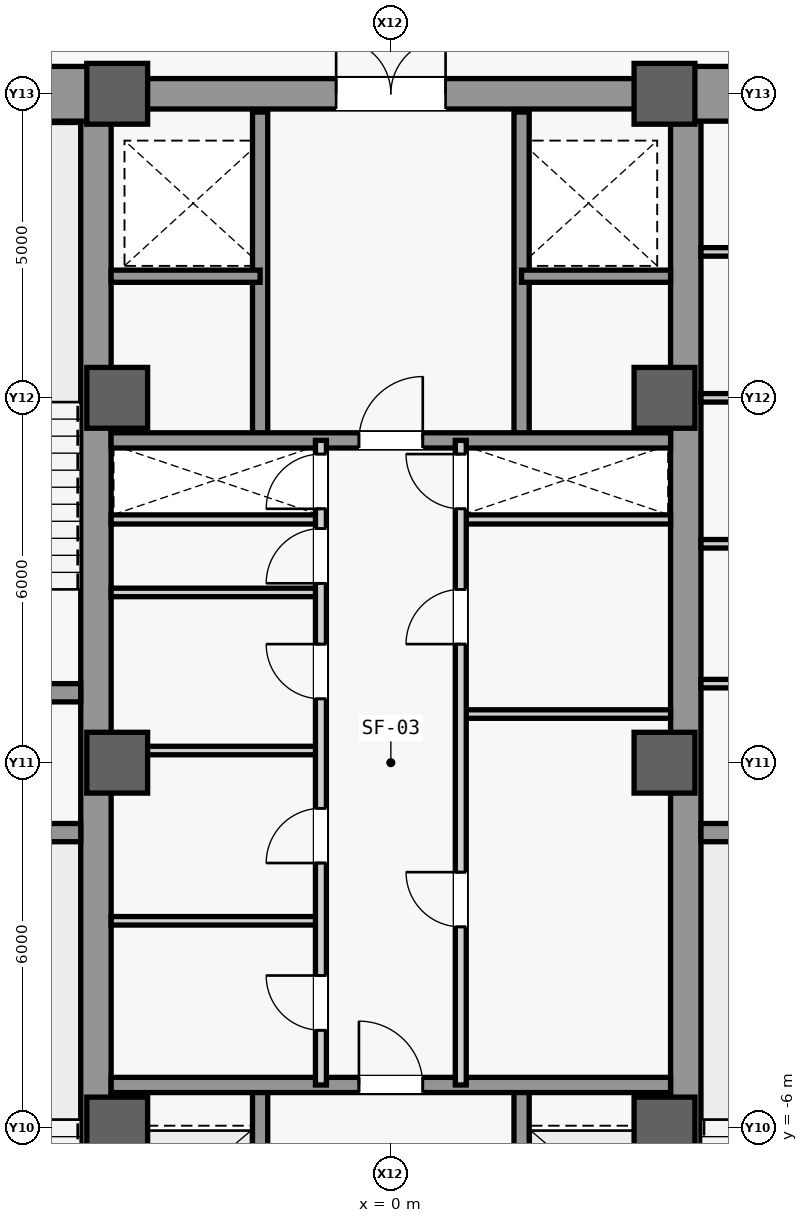
"""IFC4 building model, lengths in metres.
Left out: names, types, materials, properties, quantities, classifications, styles, units other than length and angle.
Written with IfcOpenShell. Run it as: python <this file> out.ifc"""

import sys

from ifc_helpers import new_model, si_unit, direction, frame, frame_2d, origin, origin_2d, place, context, subcontext, project, spatial, rectangle, extrude, source, transform, mapped, element, fill, save


model = new_model("IFC4")
c1 = context("Model", 3, precision=1e-05, world=origin(), true_north=direction((0.0, 1.0)))
c2 = subcontext(c1, "Body", "Model", "MODEL_VIEW")
j1 = project(units=[si_unit("LENGTHUNIT", "METRE"), si_unit("PLANEANGLEUNIT", "RADIAN")], contexts=[c1])
p1 = place(None, origin())
s1 = spatial("IfcSite", under=j1, at=p1, CompositionType="ELEMENT")
p2 = place(p1, origin())
s2 = spatial("IfcBuilding", under=s1, at=p2, CompositionType="ELEMENT")
p3 = place(p2, frame((0.0, 0.0, 57.8)))
s3 = spatial("IfcBuildingStorey", under=s2, at=p3, CompositionType="ELEMENT", Elevation=57.8)
m1 = source(origin(), c2, "Body", "SweptSolid", [
    extrude(rectangle(XDim=21.4, YDim=0.5, at=frame_2d((10.7, 0.0))), origin(), (0.0, 0.0, 1.0), 3.94),
])
for number, where, z_axis, x_axis in (
    (1, (-4.85, -10.7, 0.0), (0.0, 0.0, 1.0), (0.0, 1.0, 0.0)),
    (2, (4.85, -10.7, 0.0), (0.0, 0.0, 1.0), (0.0, 1.0, 0.0)),
):
    element("IfcWall", number, at=place(p3, frame(where, z_axis=z_axis, x_axis=x_axis)), inside=s3, PredefinedType="SHEAR", context=c2, shape_type="MappedRepresentation", body=[
        mapped(m1, transform((0.0, 0.0, 0.0), scale=1.0)),
    ])
m2 = source(origin(), c2, "Body", "SweptSolid", [
    extrude(rectangle(XDim=5.85, YDim=0.9, at=frame_2d((2.925, 0.0))), origin(), (0.0, 0.0, 1.0), 3.94),
])
p4 = place(p3, frame((-10.7, 11.0, 0.0), z_axis=(0.0, 0.0, 1.0), x_axis=(1.0, 0.0, 0.0)))
e3 = element("IfcWall", 3, at=p4, inside=s3, PredefinedType="SHEAR", context=c2, shape_type="MappedRepresentation", body=[
    mapped(m2, transform((0.0, 0.0, 0.0), scale=1.0)),
])
p5 = place(p3, frame((4.85, 11.0, 0.0), z_axis=(0.0, 0.0, 1.0), x_axis=(1.0, 0.0, 0.0)))
e4 = element("IfcWall", 4, at=p5, inside=s3, PredefinedType="SHEAR", context=c2, shape_type="MappedRepresentation", body=[
    mapped(m2, transform((0.0, 0.0, 0.0), scale=1.0)),
])
m3 = source(origin(), c2, "Body", "SweptSolid", [
    extrude(rectangle(XDim=1.05, YDim=2.2, at=frame_2d((0.525, 1.1))), frame((0.0, 0.46, 0.0), z_axis=(0.0, -1.0, 0.0), x_axis=(1.0, 0.0, 0.0)), (0.0, 0.0, 1.0), 0.92),
])
p6 = place(p5, frame((1.375, 0.0, 0.0)))
e5 = element("IfcOpeningElement", 5, at=p6, cuts=e4, PredefinedType="OPENING", context=c2, shape_type="MappedRepresentation", body=[
    mapped(m3, transform((0.0, 0.0, 0.0), scale=1.0)),
])
m4 = source(origin(), c2, "Body", "SweptSolid", [
    extrude(rectangle(XDim=5.6, YDim=0.3, at=frame_2d((2.8, 0.0))), origin(), (0.0, 0.0, 1.0), 3.94),
])
for number, where, z_axis, x_axis in (
    (6, (-10.7, -1.15, 0.0), (0.0, 0.0, 1.0), (1.0, 0.0, 0.0)),
    (7, (-10.7, 1.15, 0.0), (0.0, 0.0, 1.0), (1.0, 0.0, 0.0)),
    (8, (5.1, -1.15, 0.0), (0.0, 0.0, 1.0), (1.0, 0.0, 0.0)),
):
    element("IfcWall", number, at=place(p3, frame(where, z_axis=z_axis, x_axis=x_axis)), inside=s3, PredefinedType="SHEAR", context=c2, shape_type="MappedRepresentation", body=[
        mapped(m4, transform((0.0, 0.0, 0.0), scale=1.0)),
    ])
m5 = source(origin(), c2, "Body", "SweptSolid", [
    extrude(rectangle(XDim=9.2, YDim=0.5, at=frame_2d((4.6, 0.0))), origin(), (0.0, 0.0, 1.0), 3.94),
])
p7 = place(p3, frame((-4.6, 11.0, 0.0), z_axis=(0.0, 0.0, 1.0), x_axis=(1.0, 0.0, 0.0)))
e9 = element("IfcWall", 9, at=p7, inside=s3, PredefinedType="SHEAR", context=c2, shape_type="MappedRepresentation", body=[
    mapped(m5, transform((0.0, 0.0, 0.0), scale=1.0)),
])
m6 = source(origin(), c2, "Body", "SweptSolid", [
    extrude(rectangle(XDim=1.8, YDim=2.25, at=frame_2d((0.9, 1.125))), frame((0.0, 0.26, 0.0), z_axis=(0.0, -1.0, 0.0), x_axis=(1.0, 0.0, 0.0)), (0.0, 0.0, 1.0), 0.52),
])
p8 = place(p7, frame((3.7, 0.0, 0.0)))
e10 = element("IfcOpeningElement", 10, at=p8, cuts=e9, PredefinedType="OPENING", context=c2, shape_type="MappedRepresentation", body=[
    mapped(m6, transform((0.0, 0.0, 0.0), scale=1.0)),
])
m7 = source(origin(), c2, "Body", "SweptSolid", [
    extrude(rectangle(XDim=1.0, YDim=1.0, at=origin_2d()), origin(), (0.0, 0.0, 1.0), 4.2),
])
for number, where, z_axis, x_axis in (
    (11, (-4.5, -6.0, 0.0), (0.0, 0.0, 1.0), (1.0, 0.0, 0.0)),
    (12, (-4.5, 0.0, 0.0), (0.0, 0.0, 1.0), (1.0, 0.0, 0.0)),
    (13, (-4.5, 6.0, 0.0), (0.0, 0.0, 1.0), (1.0, 0.0, 0.0)),
    (14, (-4.5, 11.0, 0.0), (0.0, 0.0, 1.0), (1.0, 0.0, 0.0)),
    (15, (4.5, -6.0, 0.0), (0.0, 0.0, 1.0), (1.0, 0.0, 0.0)),
    (16, (4.5, 0.0, 0.0), (0.0, 0.0, 1.0), (1.0, 0.0, 0.0)),
    (17, (4.5, 6.0, 0.0), (0.0, 0.0, 1.0), (1.0, 0.0, 0.0)),
    (18, (4.5, 11.0, 0.0), (0.0, 0.0, 1.0), (1.0, 0.0, 0.0)),
):
    element("IfcColumn", number, at=place(p3, frame(where, z_axis=z_axis, x_axis=x_axis)), inside=s3, PredefinedType="COLUMN", context=c2, shape_type="MappedRepresentation", body=[
        mapped(m7, transform((0.0, 0.0, 0.0), scale=1.0)),
    ])
m8 = source(origin(), c2, "Body", "SweptSolid", [
    extrude(rectangle(XDim=3.15, YDim=0.14, at=frame_2d((1.575, 0.0))), origin(), (0.0, 0.0, 1.0), 3.94),
])
p9 = place(p3, frame((5.1, 1.3, 0.0), z_axis=(0.0, 0.0, 1.0), x_axis=(1.0, 0.0, 0.0)))
e19 = element("IfcWall", 19, at=p9, inside=s3, PredefinedType="PARTITIONING", context=c2, shape_type="MappedRepresentation", body=[
    mapped(m8, transform((0.0, 0.0, 0.0), scale=1.0)),
])
p10 = place(p3, frame((5.1, 8.4, 0.0), z_axis=(0.0, 0.0, 1.0), x_axis=(1.0, 0.0, 0.0)))
e20 = element("IfcWall", 20, at=p10, inside=s3, PredefinedType="PARTITIONING", context=c2, shape_type="MappedRepresentation", body=[
    mapped(m8, transform((0.0, 0.0, 0.0), scale=1.0)),
])
m9 = source(origin(), c2, "Body", "SweptSolid", [
    extrude(rectangle(XDim=0.9, YDim=2.15, at=frame_2d((0.45, 1.075))), frame((0.0, 0.08, 0.0), z_axis=(0.0, -1.0, 0.0), x_axis=(1.0, 0.0, 0.0)), (0.0, 0.0, 1.0), 0.16),
])
p11 = place(p10, frame((1.13, 0.0, 0.0)))
e21 = element("IfcOpeningElement", 21, at=p11, cuts=e20, PredefinedType="OPENING", context=c2, shape_type="MappedRepresentation", body=[
    mapped(m9, transform((0.0, 0.0, 0.0), scale=1.0)),
])
p12 = place(p3, frame((5.1, 6.0, 0.0), z_axis=(0.0, 0.0, 1.0), x_axis=(1.0, 0.0, 0.0)))
e22 = element("IfcWall", 22, at=p12, inside=s3, PredefinedType="PARTITIONING", context=c2, shape_type="MappedRepresentation", body=[
    mapped(m8, transform((0.0, 0.0, 0.0), scale=1.0)),
])
p13 = place(p12, frame((1.13, 0.0, 0.0)))
e23 = element("IfcOpeningElement", 23, at=p13, cuts=e22, PredefinedType="OPENING", context=c2, shape_type="MappedRepresentation", body=[
    mapped(m9, transform((0.0, 0.0, 0.0), scale=1.0)),
])
p14 = place(p3, frame((5.1, 3.6, 0.0), z_axis=(0.0, 0.0, 1.0), x_axis=(1.0, 0.0, 0.0)))
e24 = element("IfcWall", 24, at=p14, inside=s3, PredefinedType="PARTITIONING", context=c2, shape_type="MappedRepresentation", body=[
    mapped(m8, transform((0.0, 0.0, 0.0), scale=1.0)),
])
p15 = place(p14, frame((1.13, 0.0, 0.0)))
e25 = element("IfcOpeningElement", 25, at=p15, cuts=e24, PredefinedType="OPENING", context=c2, shape_type="MappedRepresentation", body=[
    mapped(m9, transform((0.0, 0.0, 0.0), scale=1.0)),
])
m10 = source(origin(), c2, "Body", "SweptSolid", [
    extrude(rectangle(XDim=3.45, YDim=0.15, at=frame_2d((1.725, 0.0))), origin(), (0.0, 0.0, 1.0), 3.94),
])
for number, where, z_axis, x_axis in (
    (26, (-4.6, 4.0, 0.0), (0.0, 0.0, 1.0), (1.0, 0.0, 0.0)),
    (27, (1.15, 4.0, 0.0), (0.0, 0.0, 1.0), (1.0, 0.0, 0.0)),
):
    element("IfcWall", number, at=place(p3, frame(where, z_axis=z_axis, x_axis=x_axis)), inside=s3, PredefinedType="PARTITIONING", context=c2, shape_type="MappedRepresentation", body=[
        mapped(m10, transform((0.0, 0.0, 0.0), scale=1.0)),
    ])
m11 = source(origin(), c2, "Body", "SweptSolid", [
    extrude(rectangle(XDim=5.4, YDim=0.25, at=frame_2d((2.7, 0.0))), origin(), (0.0, 0.0, 1.0), 3.94),
])
p16 = place(p3, frame((-2.15, -10.7, 0.0), z_axis=(0.0, 0.0, 1.0), x_axis=(0.0, 1.0, 0.0)))
e28 = element("IfcWall", 28, at=p16, inside=s3, PredefinedType="SHEAR", context=c2, shape_type="MappedRepresentation", body=[
    mapped(m11, transform((0.0, 0.0, 0.0), scale=1.0)),
])
m12 = source(origin(), c2, "Body", "SweptSolid", [
    extrude(rectangle(XDim=1.2, YDim=2.3, at=frame_2d((0.6, 1.15))), frame((0.0, 0.135, 0.0), z_axis=(0.0, -1.0, 0.0), x_axis=(1.0, 0.0, 0.0)), (0.0, 0.0, 1.0), 0.27),
])
p17 = place(p16, frame((0.9, 0.0, 0.0)))
e29 = element("IfcOpeningElement", 29, at=p17, cuts=e28, PredefinedType="OPENING", context=c2, shape_type="MappedRepresentation", body=[
    mapped(m12, transform((0.0, 0.0, 0.0), scale=1.0)),
])
p18 = place(p16, frame((3.2, 0.0, 0.0)))
e30 = element("IfcOpeningElement", 30, at=p18, cuts=e28, PredefinedType="OPENING", context=c2, shape_type="MappedRepresentation", body=[
    mapped(m12, transform((0.0, 0.0, 0.0), scale=1.0)),
])
p19 = place(p3, frame((2.15, -10.7, 0.0), z_axis=(0.0, 0.0, 1.0), x_axis=(0.0, 1.0, 0.0)))
e31 = element("IfcWall", 31, at=p19, inside=s3, PredefinedType="SHEAR", context=c2, shape_type="MappedRepresentation", body=[
    mapped(m11, transform((0.0, 0.0, 0.0), scale=1.0)),
])
p20 = place(p19, frame((0.9, 0.0, 0.0)))
e32 = element("IfcOpeningElement", 32, at=p20, cuts=e31, PredefinedType="OPENING", context=c2, shape_type="MappedRepresentation", body=[
    mapped(m12, transform((0.0, 0.0, 0.0), scale=1.0)),
])
p21 = place(p19, frame((3.2, 0.0, 0.0)))
e33 = element("IfcOpeningElement", 33, at=p21, cuts=e31, PredefinedType="OPENING", context=c2, shape_type="MappedRepresentation", body=[
    mapped(m12, transform((0.0, 0.0, 0.0), scale=1.0)),
])
m13 = source(origin(), c2, "Body", "SweptSolid", [
    extrude(rectangle(XDim=9.2, YDim=0.25, at=frame_2d((4.6, 0.0))), origin(), (0.0, 0.0, 1.0), 3.94),
])
p22 = place(p3, frame((-4.6, -5.3, 0.0), z_axis=(0.0, 0.0, 1.0), x_axis=(1.0, 0.0, 0.0)))
e34 = element("IfcWall", 34, at=p22, inside=s3, PredefinedType="SHEAR", context=c2, shape_type="MappedRepresentation", body=[
    mapped(m13, transform((0.0, 0.0, 0.0), scale=1.0)),
])
m14 = source(origin(), c2, "Body", "SweptSolid", [
    extrude(rectangle(XDim=1.05, YDim=2.2, at=frame_2d((0.525, 1.1))), frame((0.0, 0.135, 0.0), z_axis=(0.0, -1.0, 0.0), x_axis=(1.0, 0.0, 0.0)), (0.0, 0.0, 1.0), 0.27),
])
p23 = place(p22, frame((4.075, 0.0, 0.0)))
e35 = element("IfcOpeningElement", 35, at=p23, cuts=e34, PredefinedType="OPENING", context=c2, shape_type="MappedRepresentation", body=[
    mapped(m14, transform((0.0, 0.0, 0.0), scale=1.0)),
])
for number, where, z_axis, x_axis in (
    (36, (-2.15, 5.3, 0.0), (0.0, 0.0, 1.0), (0.0, 1.0, 0.0)),
    (37, (2.15, 5.3, 0.0), (0.0, 0.0, 1.0), (0.0, 1.0, 0.0)),
):
    element("IfcWall", number, at=place(p3, frame(where, z_axis=z_axis, x_axis=x_axis)), inside=s3, PredefinedType="SHEAR", context=c2, shape_type="MappedRepresentation", body=[
        mapped(m11, transform((0.0, 0.0, 0.0), scale=1.0)),
    ])
m15 = source(origin(), c2, "Body", "SweptSolid", [
    extrude(rectangle(XDim=2.45, YDim=0.2, at=frame_2d((1.225, 0.0))), origin(), (0.0, 0.0, 1.0), 3.94),
])
for number, where, z_axis, x_axis in (
    (38, (-4.6, 8.0, 0.0), (0.0, 0.0, 1.0), (1.0, 0.0, 0.0)),
    (39, (2.15, 8.0, 0.0), (0.0, 0.0, 1.0), (1.0, 0.0, 0.0)),
):
    element("IfcWall", number, at=place(p3, frame(where, z_axis=z_axis, x_axis=x_axis)), inside=s3, PredefinedType="SHEAR", context=c2, shape_type="MappedRepresentation", body=[
        mapped(m15, transform((0.0, 0.0, 0.0), scale=1.0)),
    ])
p24 = place(p3, frame((-4.6, 5.3, 0.0), z_axis=(0.0, 0.0, 1.0), x_axis=(1.0, 0.0, 0.0)))
e40 = element("IfcWall", 40, at=p24, inside=s3, PredefinedType="SHEAR", context=c2, shape_type="MappedRepresentation", body=[
    mapped(m13, transform((0.0, 0.0, 0.0), scale=1.0)),
])
p25 = place(p24, frame((4.075, 0.0, 0.0)))
e41 = element("IfcOpeningElement", 41, at=p25, cuts=e40, PredefinedType="OPENING", context=c2, shape_type="MappedRepresentation", body=[
    mapped(m14, transform((0.0, 0.0, 0.0), scale=1.0)),
])
m16 = source(origin(), c2, "Body", "SweptSolid", [
    extrude(rectangle(XDim=3.45, YDim=0.14, at=frame_2d((1.725, 0.0))), origin(), (0.0, 0.0, 1.0), 3.94),
])
p26 = place(p3, frame((-4.6, -2.6, 0.0), z_axis=(0.0, 0.0, 1.0), x_axis=(1.0, 0.0, 0.0)))
e42 = element("IfcWall", 42, at=p26, inside=s3, PredefinedType="PARTITIONING", context=c2, shape_type="MappedRepresentation", body=[
    mapped(m16, transform((0.0, 0.0, 0.0), scale=1.0)),
])
m17 = source(origin(), c2, "Body", "SweptSolid", [
    extrude(rectangle(XDim=3.45, YDim=0.14, at=frame_2d((1.725, 0.0))), origin(), (0.0, 0.0, 1.0), 3.245),
])
p27 = place(p3, frame((-4.6, 0.2, 0.0), z_axis=(0.0, 0.0, 1.0), x_axis=(1.0, 0.0, 0.0)))
e43 = element("IfcWall", 43, at=p27, inside=s3, PredefinedType="PARTITIONING", context=c2, shape_type="MappedRepresentation", body=[
    mapped(m17, transform((0.0, 0.0, 0.0), scale=1.0)),
])
p28 = place(p3, frame((-4.6, 2.8, 0.0), z_axis=(0.0, 0.0, 1.0), x_axis=(1.0, 0.0, 0.0)))
e44 = element("IfcWall", 44, at=p28, inside=s3, PredefinedType="PARTITIONING", context=c2, shape_type="MappedRepresentation", body=[
    mapped(m16, transform((0.0, 0.0, 0.0), scale=1.0)),
])
m18 = source(origin(), c2, "Body", "SweptSolid", [
    extrude(rectangle(XDim=10.6, YDim=0.18, at=frame_2d((5.3, 0.0))), origin(), (0.0, 0.0, 1.0), 3.94),
])
p29 = place(p3, frame((-1.15, -5.3, 0.0), z_axis=(0.0, 0.0, 1.0), x_axis=(0.0, 1.0, 0.0)))
e45 = element("IfcWall", 45, at=p29, inside=s3, PredefinedType="PARTITIONING", context=c2, shape_type="MappedRepresentation", body=[
    mapped(m18, transform((0.0, 0.0, 0.0), scale=1.0)),
])
m19 = source(origin(), c2, "Body", "SweptSolid", [
    extrude(rectangle(XDim=0.9, YDim=2.15, at=frame_2d((0.45, 1.075))), frame((0.0, 0.1, 0.0), z_axis=(0.0, -1.0, 0.0), x_axis=(1.0, 0.0, 0.0)), (0.0, 0.0, 1.0), 0.2),
])
p30 = place(p29, frame((0.9, 0.0, 0.0)))
e46 = element("IfcOpeningElement", 46, at=p30, cuts=e45, PredefinedType="OPENING", context=c2, shape_type="MappedRepresentation", body=[
    mapped(m19, transform((0.0, 0.0, 0.0), scale=1.0)),
])
p31 = place(p29, frame((3.65, 0.0, 0.0)))
e47 = element("IfcOpeningElement", 47, at=p31, cuts=e45, PredefinedType="OPENING", context=c2, shape_type="MappedRepresentation", body=[
    mapped(m19, transform((0.0, 0.0, 0.0), scale=1.0)),
])
p32 = place(p29, frame((6.35, 0.0, 0.0)))
e48 = element("IfcOpeningElement", 48, at=p32, cuts=e45, PredefinedType="OPENING", context=c2, shape_type="MappedRepresentation", body=[
    mapped(m19, transform((0.0, 0.0, 0.0), scale=1.0)),
])
p33 = place(p29, frame((8.25, 0.0, 0.0)))
e49 = element("IfcOpeningElement", 49, at=p33, cuts=e45, PredefinedType="OPENING", context=c2, shape_type="MappedRepresentation", body=[
    mapped(m19, transform((0.0, 0.0, 0.0), scale=1.0)),
])
p34 = place(p29, frame((9.475, 0.0, 0.0)))
e50 = element("IfcOpeningElement", 50, at=p34, cuts=e45, PredefinedType="OPENING", context=c2, shape_type="MappedRepresentation", body=[
    mapped(m19, transform((0.0, 0.0, 0.0), scale=1.0)),
])
p35 = place(p3, frame((1.15, 0.8, 0.0), z_axis=(0.0, 0.0, 1.0), x_axis=(1.0, 0.0, 0.0)))
e51 = element("IfcWall", 51, at=p35, inside=s3, PredefinedType="PARTITIONING", context=c2, shape_type="MappedRepresentation", body=[
    mapped(m16, transform((0.0, 0.0, 0.0), scale=1.0)),
])
p36 = place(p3, frame((1.15, -5.3, 0.0), z_axis=(0.0, 0.0, 1.0), x_axis=(0.0, 1.0, 0.0)))
e52 = element("IfcWall", 52, at=p36, inside=s3, PredefinedType="PARTITIONING", context=c2, shape_type="MappedRepresentation", body=[
    mapped(m18, transform((0.0, 0.0, 0.0), scale=1.0)),
])
p37 = place(p36, frame((2.6, 0.0, 0.0)))
e53 = element("IfcOpeningElement", 53, at=p37, cuts=e52, PredefinedType="OPENING", context=c2, shape_type="MappedRepresentation", body=[
    mapped(m19, transform((0.0, 0.0, 0.0), scale=1.0)),
])
p38 = place(p36, frame((7.25, 0.0, 0.0)))
e54 = element("IfcOpeningElement", 54, at=p38, cuts=e52, PredefinedType="OPENING", context=c2, shape_type="MappedRepresentation", body=[
    mapped(m19, transform((0.0, 0.0, 0.0), scale=1.0)),
])
p39 = place(p36, frame((9.475, 0.0, 0.0)))
e55 = element("IfcOpeningElement", 55, at=p39, cuts=e52, PredefinedType="OPENING", context=c2, shape_type="MappedRepresentation", body=[
    mapped(m19, transform((0.0, 0.0, 0.0), scale=1.0)),
])
m20 = source(origin(), c2, "Body", "SweptSolid", [
    extrude(rectangle(XDim=1.05, YDim=2.2, at=frame_2d((0.525, 1.1))), frame((0.0, 0.025, 0.0), z_axis=(0.0, -1.0, 0.0), x_axis=(1.0, 0.0, 0.0)), (0.0, 0.0, 1.0), 0.05),
])
p40 = place(p23, origin())
e56 = element("IfcDoor", 56, at=p40, inside=s3, OperationType="SINGLE_SWING_LEFT", PredefinedType="DOOR", context=c2, shape_type="MappedRepresentation", body=[
    mapped(m20, transform((0.0, 0.0, 0.0), scale=1.0)),
])
fill(e35, e56)
p41 = place(p25, origin())
e57 = element("IfcDoor", 57, at=p41, inside=s3, OperationType="SINGLE_SWING_RIGHT", PredefinedType="DOOR", context=c2, shape_type="MappedRepresentation", body=[
    mapped(m20, transform((0.0, 0.0, 0.0), scale=1.0)),
])
fill(e41, e57)
m21 = source(origin(), c2, "Body", "SweptSolid", [
    extrude(rectangle(XDim=1.8, YDim=2.25, at=frame_2d((0.9, 1.125))), frame((0.0, 0.025, 0.0), z_axis=(0.0, -1.0, 0.0), x_axis=(1.0, 0.0, 0.0)), (0.0, 0.0, 1.0), 0.05),
])
p42 = place(p8, origin())
e58 = element("IfcDoor", 58, at=p42, inside=s3, OperationType="SINGLE_SWING_RIGHT", PredefinedType="DOOR", context=c2, shape_type="MappedRepresentation", body=[
    mapped(m21, transform((0.0, 0.0, 0.0), scale=1.0)),
])
fill(e10, e58)
m22 = source(origin(), c2, "Body", "SweptSolid", [
    extrude(rectangle(XDim=0.9, YDim=2.15, at=frame_2d((0.45, 1.075))), frame((0.0, 0.025, 0.0), z_axis=(0.0, -1.0, 0.0), x_axis=(1.0, 0.0, 0.0)), (0.0, 0.0, 1.0), 0.05),
])
p43 = place(p30, origin())
e59 = element("IfcDoor", 59, at=p43, inside=s3, OperationType="SINGLE_SWING_RIGHT", PredefinedType="DOOR", context=c2, shape_type="MappedRepresentation", body=[
    mapped(m22, transform((0.0, 0.0, 0.0), scale=1.0)),
])
fill(e46, e59)
p44 = place(p31, origin())
e60 = element("IfcDoor", 60, at=p44, inside=s3, OperationType="SINGLE_SWING_LEFT", PredefinedType="DOOR", context=c2, shape_type="MappedRepresentation", body=[
    mapped(m22, transform((0.0, 0.0, 0.0), scale=1.0)),
])
fill(e47, e60)
p45 = place(p32, origin())
e61 = element("IfcDoor", 61, at=p45, inside=s3, OperationType="SINGLE_SWING_RIGHT", PredefinedType="DOOR", context=c2, shape_type="MappedRepresentation", body=[
    mapped(m22, transform((0.0, 0.0, 0.0), scale=1.0)),
])
fill(e48, e61)
p46 = place(p33, origin())
e62 = element("IfcDoor", 62, at=p46, inside=s3, OperationType="SINGLE_SWING_LEFT", PredefinedType="DOOR", context=c2, shape_type="MappedRepresentation", body=[
    mapped(m22, transform((0.0, 0.0, 0.0), scale=1.0)),
])
fill(e49, e62)
p47 = place(p37, origin())
e63 = element("IfcDoor", 63, at=p47, inside=s3, OperationType="SINGLE_SWING_RIGHT", PredefinedType="DOOR", context=c2, shape_type="MappedRepresentation", body=[
    mapped(m22, transform((0.0, 0.0, 0.0), scale=1.0)),
])
fill(e53, e63)
p48 = place(p38, origin())
e64 = element("IfcDoor", 64, at=p48, inside=s3, OperationType="SINGLE_SWING_LEFT", PredefinedType="DOOR", context=c2, shape_type="MappedRepresentation", body=[
    mapped(m22, transform((0.0, 0.0, 0.0), scale=1.0)),
])
fill(e54, e64)
p49 = place(p34, origin())
e65 = element("IfcDoor", 65, at=p49, inside=s3, OperationType="SINGLE_SWING_LEFT", PredefinedType="DOOR", context=c2, shape_type="MappedRepresentation", body=[
    mapped(m22, transform((0.0, 0.0, 0.0), scale=1.0)),
])
fill(e50, e65)
p50 = place(p39, origin())
e66 = element("IfcDoor", 66, at=p50, inside=s3, OperationType="SINGLE_SWING_RIGHT", PredefinedType="DOOR", context=c2, shape_type="MappedRepresentation", body=[
    mapped(m22, transform((0.0, 0.0, 0.0), scale=1.0)),
])
fill(e55, e66)
save(model, sys.argv[1])
